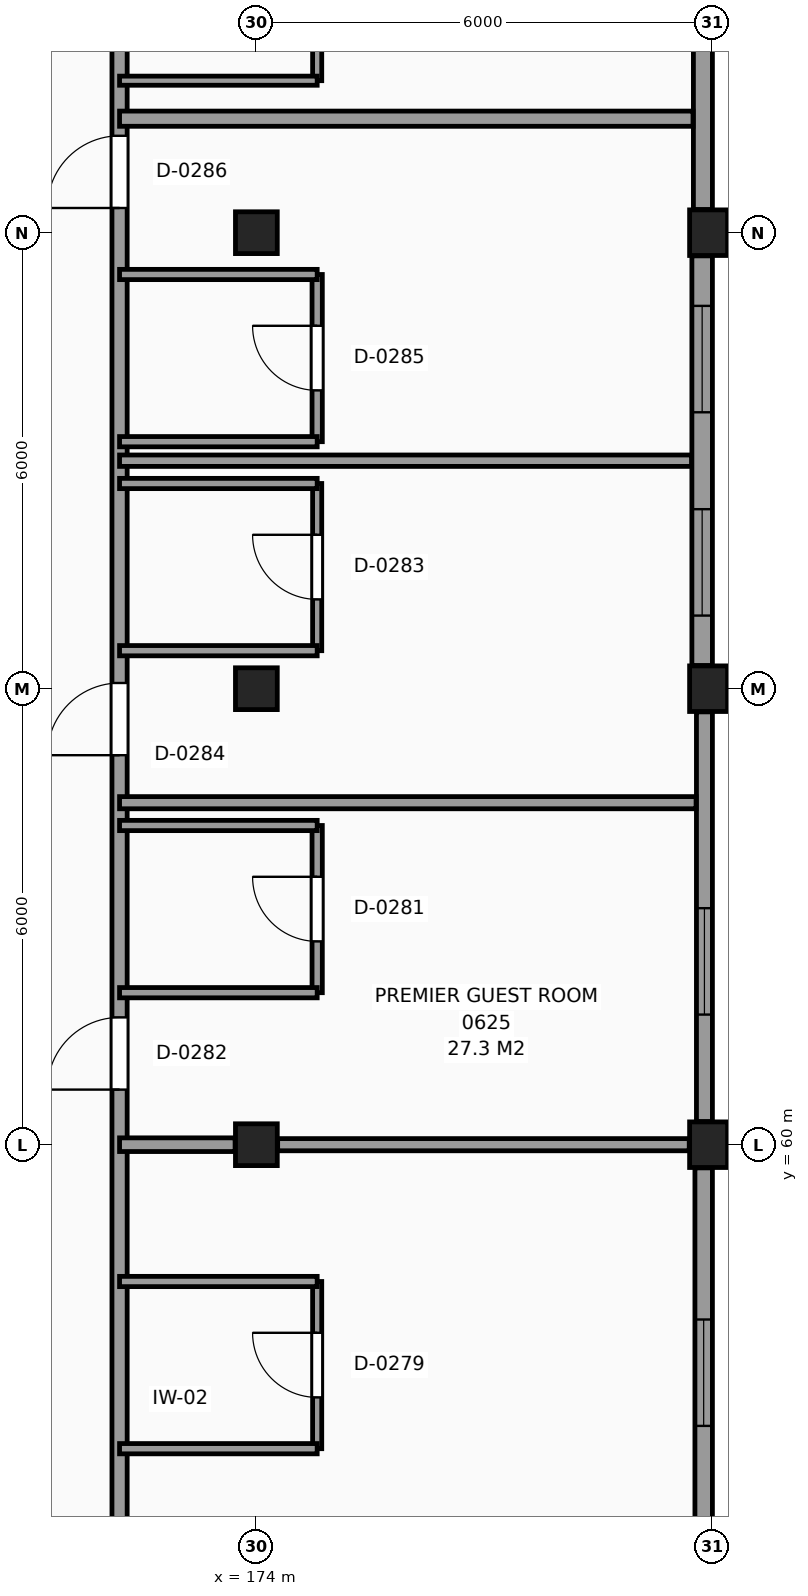
"""IFC4 building model, lengths in metres.
Left out: names, types, materials, properties, quantities, classifications, styles, units other than length and angle.
Written with IfcOpenShell. Run it as: python <this file> out.ifc"""

import sys

from ifc_helpers import new_model, si_unit, direction, frame, frame_2d, origin, origin_2d, place, context, subcontext, project, spatial, rectangle, extrude, element, fill, save


model = new_model("IFC4")
c1 = context("Model", 3, precision=1e-05, world=origin(), true_north=direction((0.0, 1.0)))
c2 = subcontext(c1, "Body", "Model", "MODEL_VIEW")
j1 = project(units=[si_unit("LENGTHUNIT", "METRE"), si_unit("PLANEANGLEUNIT", "RADIAN")], contexts=[c1])
p1 = place(None, origin())
s1 = spatial("IfcSite", under=j1, at=p1, CompositionType="ELEMENT")
p2 = place(p1, origin())
s2 = spatial("IfcBuilding", under=s1, at=p2, CompositionType="ELEMENT")
p3 = place(p2, frame((0.0, 0.0, 28.2)))
s3 = spatial("IfcBuildingStorey", under=s2, at=p3, CompositionType="ELEMENT", Elevation=28.2)
for number, where, z_axis, x_axis in (
    (1, (174.0, 60.0, 0.0), (0.0, 0.0, 1.0), (1.0, 0.0, 0.0)),
    (2, (174.0, 66.0, 0.0), (0.0, 0.0, 1.0), (1.0, 0.0, 0.0)),
    (3, (174.0, 72.0, 0.0), (0.0, 0.0, 1.0), (1.0, 0.0, 0.0)),
):
    element("IfcColumn", number, at=place(p3, frame(where, z_axis=z_axis, x_axis=x_axis)), inside=s3, PredefinedType="COLUMN", context=c2, shape_type="SweptSolid", body=[
        extrude(rectangle(XDim=0.55, YDim=0.55, at=origin_2d()), origin(), (0.0, 0.0, 1.0), 3.3),
    ])
for number, where, z_axis, x_axis in (
    (4, (180.0, 60.0, 0.0), (0.0, 0.0, 1.0), (1.0, 0.0, 0.0)),
    (5, (180.0, 66.0, 0.0), (0.0, 0.0, 1.0), (1.0, 0.0, 0.0)),
    (6, (180.0, 72.0, 0.0), (0.0, 0.0, 1.0), (1.0, 0.0, 0.0)),
):
    element("IfcColumn", number, at=place(p3, frame(where, z_axis=z_axis, x_axis=x_axis)), inside=s3, PredefinedType="COLUMN", context=c2, shape_type="SweptSolid", body=[
        extrude(rectangle(XDim=0.6, YDim=0.6, at=origin_2d()), origin(), (0.0, 0.0, 1.0), 3.3),
    ])
p4 = place(p3, frame((179.885, 54.305, 0.0), z_axis=(0.0, 0.0, 1.0), x_axis=(0.0, 1.0, 0.0)))
e7 = element("IfcWall", 7, at=p4, inside=s3, PredefinedType="SOLIDWALL", context=c2, shape_type="SweptSolid", body=[
    extrude(rectangle(XDim=5.39, YDim=0.23, at=frame_2d((2.695, 0.0))), origin(), (0.0, 0.0, 1.0), 2.43),
])
p5 = place(p4, frame((1.995, 0.0, 0.8)))
e8 = element("IfcOpeningElement", 8, at=p5, cuts=e7, PredefinedType="OPENING", context=c2, shape_type="SweptSolid", body=[
    extrude(rectangle(XDim=1.4, YDim=1.4, at=frame_2d((0.7, 0.7))), frame((0.0, 0.125, 0.0), z_axis=(0.0, -1.0, 0.0), x_axis=(1.0, 0.0, 0.0)), (0.0, 0.0, 1.0), 0.25),
])
p6 = place(p3, frame((179.895, 60.305, 0.0), z_axis=(0.0, 0.0, 1.0), x_axis=(0.0, 1.0, 0.0)))
e9 = element("IfcWall", 9, at=p6, inside=s3, PredefinedType="SOLIDWALL", context=c2, shape_type="SweptSolid", body=[
    extrude(rectangle(XDim=5.39, YDim=0.21, at=frame_2d((2.695, 0.0))), origin(), (0.0, 0.0, 1.0), 2.43),
])
p7 = place(p6, frame((1.407, 0.0, 0.8)))
e10 = element("IfcOpeningElement", 10, at=p7, cuts=e9, PredefinedType="OPENING", context=c2, shape_type="SweptSolid", body=[
    extrude(rectangle(XDim=1.4, YDim=1.4, at=frame_2d((0.7, 0.7))), frame((0.0, 0.115, 0.0), z_axis=(0.0, -1.0, 0.0), x_axis=(1.0, 0.0, 0.0)), (0.0, 0.0, 1.0), 0.23),
])
p8 = place(p3, frame((179.865, 66.305, 0.0), z_axis=(0.0, 0.0, 1.0), x_axis=(0.0, 1.0, 0.0)))
e11 = element("IfcWall", 11, at=p8, inside=s3, PredefinedType="SOLIDWALL", context=c2, shape_type="SweptSolid", body=[
    extrude(rectangle(XDim=5.39, YDim=0.27, at=frame_2d((2.695, 0.0))), origin(), (0.0, 0.0, 1.0), 2.43),
])
p9 = place(p8, frame((0.657, 0.0, 0.8)))
e12 = element("IfcOpeningElement", 12, at=p9, cuts=e11, PredefinedType="OPENING", context=c2, shape_type="SweptSolid", body=[
    extrude(rectangle(XDim=1.4, YDim=1.4, at=frame_2d((0.7, 0.7))), frame((0.0, 0.145, 0.0), z_axis=(0.0, -1.0, 0.0), x_axis=(1.0, 0.0, 0.0)), (0.0, 0.0, 1.0), 0.29),
])
p10 = place(p8, frame((3.332, 0.0, 0.8)))
e13 = element("IfcOpeningElement", 13, at=p10, cuts=e11, PredefinedType="OPENING", context=c2, shape_type="SweptSolid", body=[
    extrude(rectangle(XDim=1.4, YDim=1.4, at=frame_2d((0.7, 0.7))), frame((0.0, 0.145, 0.0), z_axis=(0.0, -1.0, 0.0), x_axis=(1.0, 0.0, 0.0)), (0.0, 0.0, 1.0), 0.29),
])
p11 = place(p3, frame((179.875, 72.305, 0.0), z_axis=(0.0, 0.0, 1.0), x_axis=(0.0, 1.0, 0.0)))
e14 = element("IfcWall", 14, at=p11, inside=s3, PredefinedType="SOLIDWALL", context=c2, shape_type="SweptSolid", body=[
    extrude(rectangle(XDim=5.39, YDim=0.25, at=frame_2d((2.695, 0.0))), origin(), (0.0, 0.0, 1.0), 2.43),
])
p12 = place(p11, frame((2.582, 0.0, 0.8)))
e15 = element("IfcOpeningElement", 15, at=p12, cuts=e14, PredefinedType="OPENING", context=c2, shape_type="SweptSolid", body=[
    extrude(rectangle(XDim=1.4, YDim=1.4, at=frame_2d((0.7, 0.7))), frame((0.0, 0.135, 0.0), z_axis=(0.0, -1.0, 0.0), x_axis=(1.0, 0.0, 0.0)), (0.0, 0.0, 1.0), 0.27),
])
p13 = place(p3, frame((172.2, 42.275, 0.0), z_axis=(0.0, 0.0, 1.0), x_axis=(0.0, 1.0, 0.0)))
e16 = element("IfcWall", 16, at=p13, inside=s3, PredefinedType="PARTITIONING", context=c2, shape_type="SweptSolid", body=[
    extrude(rectangle(XDim=65.545, YDim=0.2, at=frame_2d((32.772, 0.0))), origin(), (0.0, 0.0, 1.0), 3.08),
])
p14 = place(p13, frame((0.4, 0.0, 0.0)))
e17 = element("IfcOpeningElement", 17, at=p14, cuts=e16, PredefinedType="OPENING", context=c2, shape_type="SweptSolid", body=[
    extrude(rectangle(XDim=0.95, YDim=2.1, at=frame_2d((0.475, 1.05))), frame((0.0, 0.11, 0.0), z_axis=(0.0, -1.0, 0.0), x_axis=(1.0, 0.0, 0.0)), (0.0, 0.0, 1.0), 0.22),
])
p15 = place(p13, frame((4.85, 0.0, 0.0)))
e18 = element("IfcOpeningElement", 18, at=p15, cuts=e16, PredefinedType="OPENING", context=c2, shape_type="SweptSolid", body=[
    extrude(rectangle(XDim=0.95, YDim=2.1, at=frame_2d((0.475, 1.05))), frame((0.0, 0.11, 0.0), z_axis=(0.0, -1.0, 0.0), x_axis=(1.0, 0.0, 0.0)), (0.0, 0.0, 1.0), 0.22),
])
p16 = place(p13, frame((9.35, 0.0, 0.0)))
e19 = element("IfcOpeningElement", 19, at=p16, cuts=e16, PredefinedType="OPENING", context=c2, shape_type="SweptSolid", body=[
    extrude(rectangle(XDim=0.95, YDim=2.1, at=frame_2d((0.475, 1.05))), frame((0.0, 0.11, 0.0), z_axis=(0.0, -1.0, 0.0), x_axis=(1.0, 0.0, 0.0)), (0.0, 0.0, 1.0), 0.22),
])
p17 = place(p13, frame((18.45, 0.0, 0.0)))
e20 = element("IfcOpeningElement", 20, at=p17, cuts=e16, PredefinedType="OPENING", context=c2, shape_type="SweptSolid", body=[
    extrude(rectangle(XDim=0.95, YDim=2.1, at=frame_2d((0.475, 1.05))), frame((0.0, 0.11, 0.0), z_axis=(0.0, -1.0, 0.0), x_axis=(1.0, 0.0, 0.0)), (0.0, 0.0, 1.0), 0.22),
])
p18 = place(p13, frame((22.85, 0.0, 0.0)))
e21 = element("IfcOpeningElement", 21, at=p18, cuts=e16, PredefinedType="OPENING", context=c2, shape_type="SweptSolid", body=[
    extrude(rectangle(XDim=0.95, YDim=2.1, at=frame_2d((0.475, 1.05))), frame((0.0, 0.11, 0.0), z_axis=(0.0, -1.0, 0.0), x_axis=(1.0, 0.0, 0.0)), (0.0, 0.0, 1.0), 0.22),
])
p19 = place(p13, frame((30.05, 0.0, 0.0)))
e22 = element("IfcOpeningElement", 22, at=p19, cuts=e16, PredefinedType="OPENING", context=c2, shape_type="SweptSolid", body=[
    extrude(rectangle(XDim=0.95, YDim=2.1, at=frame_2d((0.475, 1.05))), frame((0.0, 0.11, 0.0), z_axis=(0.0, -1.0, 0.0), x_axis=(1.0, 0.0, 0.0)), (0.0, 0.0, 1.0), 0.22),
])
p20 = place(p13, frame((38.3, 0.0, 0.0)))
e23 = element("IfcOpeningElement", 23, at=p20, cuts=e16, PredefinedType="OPENING", context=c2, shape_type="SweptSolid", body=[
    extrude(rectangle(XDim=0.95, YDim=2.1, at=frame_2d((0.475, 1.05))), frame((0.0, 0.11, 0.0), z_axis=(0.0, -1.0, 0.0), x_axis=(1.0, 0.0, 0.0)), (0.0, 0.0, 1.0), 0.22),
])
p21 = place(p13, frame((40.85, 0.0, 0.0)))
e24 = element("IfcOpeningElement", 24, at=p21, cuts=e16, PredefinedType="OPENING", context=c2, shape_type="SweptSolid", body=[
    extrude(rectangle(XDim=0.95, YDim=2.1, at=frame_2d((0.475, 1.05))), frame((0.0, 0.11, 0.0), z_axis=(0.0, -1.0, 0.0), x_axis=(1.0, 0.0, 0.0)), (0.0, 0.0, 1.0), 0.22),
])
p22 = place(p13, frame((48.05, 0.0, 0.0)))
e25 = element("IfcOpeningElement", 25, at=p22, cuts=e16, PredefinedType="OPENING", context=c2, shape_type="SweptSolid", body=[
    extrude(rectangle(XDim=0.95, YDim=2.1, at=frame_2d((0.475, 1.05))), frame((0.0, 0.11, 0.0), z_axis=(0.0, -1.0, 0.0), x_axis=(1.0, 0.0, 0.0)), (0.0, 0.0, 1.0), 0.22),
])
p23 = place(p13, frame((52.25, 0.0, 0.0)))
e26 = element("IfcOpeningElement", 26, at=p23, cuts=e16, PredefinedType="OPENING", context=c2, shape_type="SweptSolid", body=[
    extrude(rectangle(XDim=0.95, YDim=2.1, at=frame_2d((0.475, 1.05))), frame((0.0, 0.11, 0.0), z_axis=(0.0, -1.0, 0.0), x_axis=(1.0, 0.0, 0.0)), (0.0, 0.0, 1.0), 0.22),
])
p24 = place(p13, frame((54.45, 0.0, 0.0)))
e27 = element("IfcOpeningElement", 27, at=p24, cuts=e16, PredefinedType="OPENING", context=c2, shape_type="SweptSolid", body=[
    extrude(rectangle(XDim=0.95, YDim=2.1, at=frame_2d((0.475, 1.05))), frame((0.0, 0.11, 0.0), z_axis=(0.0, -1.0, 0.0), x_axis=(1.0, 0.0, 0.0)), (0.0, 0.0, 1.0), 0.22),
])
p25 = place(p13, frame((60.45, 0.0, 0.0)))
e28 = element("IfcOpeningElement", 28, at=p25, cuts=e16, PredefinedType="OPENING", context=c2, shape_type="SweptSolid", body=[
    extrude(rectangle(XDim=0.95, YDim=2.1, at=frame_2d((0.475, 1.05))), frame((0.0, 0.11, 0.0), z_axis=(0.0, -1.0, 0.0), x_axis=(1.0, 0.0, 0.0)), (0.0, 0.0, 1.0), 0.22),
])
p26 = place(p3, frame((174.8, 56.0, 0.0), z_axis=(0.0, 0.0, 1.0), x_axis=(0.0, 1.0, 0.0)))
e29 = element("IfcWall", 29, at=p26, inside=s3, PredefinedType="PARTITIONING", context=c2, shape_type="SweptSolid", body=[
    extrude(rectangle(XDim=2.2, YDim=0.12, at=frame_2d((1.1, 0.0))), origin(), (0.0, 0.0, 1.0), 3.08),
])
p27 = place(p26, frame((0.675, 0.0, 0.0)))
e30 = element("IfcOpeningElement", 30, at=p27, cuts=e29, PredefinedType="OPENING", context=c2, shape_type="SweptSolid", body=[
    extrude(rectangle(XDim=0.85, YDim=2.1, at=frame_2d((0.425, 1.05))), frame((0.0, 0.07, 0.0), z_axis=(0.0, -1.0, 0.0), x_axis=(1.0, 0.0, 0.0)), (0.0, 0.0, 1.0), 0.14),
])
p28 = place(p3, frame((174.8, 62.0, 0.0), z_axis=(0.0, 0.0, 1.0), x_axis=(0.0, 1.0, 0.0)))
e31 = element("IfcWall", 31, at=p28, inside=s3, PredefinedType="PARTITIONING", context=c2, shape_type="SweptSolid", body=[
    extrude(rectangle(XDim=2.2, YDim=0.135, at=frame_2d((1.1, 0.0))), origin(), (0.0, 0.0, 1.0), 3.08),
])
p29 = place(p28, frame((0.675, 0.0, 0.0)))
e32 = element("IfcOpeningElement", 32, at=p29, cuts=e31, PredefinedType="OPENING", context=c2, shape_type="SweptSolid", body=[
    extrude(rectangle(XDim=0.85, YDim=2.1, at=frame_2d((0.425, 1.05))), frame((0.0, 0.078, 0.0), z_axis=(0.0, -1.0, 0.0), x_axis=(1.0, 0.0, 0.0)), (0.0, 0.0, 1.0), 0.155),
])
p30 = place(p3, frame((174.8, 66.5, 0.0), z_axis=(0.0, 0.0, 1.0), x_axis=(0.0, 1.0, 0.0)))
e33 = element("IfcWall", 33, at=p30, inside=s3, PredefinedType="PARTITIONING", context=c2, shape_type="SweptSolid", body=[
    extrude(rectangle(XDim=2.2, YDim=0.12, at=frame_2d((1.1, 0.0))), origin(), (0.0, 0.0, 1.0), 3.08),
])
p31 = place(p30, frame((0.675, 0.0, 0.0)))
e34 = element("IfcOpeningElement", 34, at=p31, cuts=e33, PredefinedType="OPENING", context=c2, shape_type="SweptSolid", body=[
    extrude(rectangle(XDim=0.85, YDim=2.1, at=frame_2d((0.425, 1.05))), frame((0.0, 0.07, 0.0), z_axis=(0.0, -1.0, 0.0), x_axis=(1.0, 0.0, 0.0)), (0.0, 0.0, 1.0), 0.14),
])
p32 = place(p3, frame((174.8, 69.25, 0.0), z_axis=(0.0, 0.0, 1.0), x_axis=(0.0, 1.0, 0.0)))
e35 = element("IfcWall", 35, at=p32, inside=s3, PredefinedType="PARTITIONING", context=c2, shape_type="SweptSolid", body=[
    extrude(rectangle(XDim=2.2, YDim=0.135, at=frame_2d((1.1, 0.0))), origin(), (0.0, 0.0, 1.0), 3.08),
])
p33 = place(p32, frame((0.675, 0.0, 0.0)))
e36 = element("IfcOpeningElement", 36, at=p33, cuts=e35, PredefinedType="OPENING", context=c2, shape_type="SweptSolid", body=[
    extrude(rectangle(XDim=0.85, YDim=2.1, at=frame_2d((0.425, 1.05))), frame((0.0, 0.078, 0.0), z_axis=(0.0, -1.0, 0.0), x_axis=(1.0, 0.0, 0.0)), (0.0, 0.0, 1.0), 0.155),
])
p34 = place(p3, frame((174.8, 74.0, 0.0), z_axis=(0.0, 0.0, 1.0), x_axis=(0.0, 1.0, 0.0)))
e37 = element("IfcWall", 37, at=p34, inside=s3, PredefinedType="PARTITIONING", context=c2, shape_type="SweptSolid", body=[
    extrude(rectangle(XDim=2.2, YDim=0.12, at=frame_2d((1.1, 0.0))), origin(), (0.0, 0.0, 1.0), 3.08),
])
p35 = place(p34, frame((0.675, 0.0, 0.0)))
e38 = element("IfcOpeningElement", 38, at=p35, cuts=e37, PredefinedType="OPENING", context=c2, shape_type="SweptSolid", body=[
    extrude(rectangle(XDim=0.85, YDim=2.1, at=frame_2d((0.425, 1.05))), frame((0.0, 0.07, 0.0), z_axis=(0.0, -1.0, 0.0), x_axis=(1.0, 0.0, 0.0)), (0.0, 0.0, 1.0), 0.14),
])
for number, where, z_axis, x_axis in (
    (39, (172.2, 56.0, 0.0), (0.0, 0.0, 1.0), (1.0, 0.0, 0.0)),
    (40, (172.2, 58.2, 0.0), (0.0, 0.0, 1.0), (1.0, 0.0, 0.0)),
):
    element("IfcWall", number, at=place(p3, frame(where, z_axis=z_axis, x_axis=x_axis)), inside=s3, PredefinedType="PARTITIONING", context=c2, shape_type="SweptSolid", body=[
        extrude(rectangle(XDim=2.6, YDim=0.135, at=frame_2d((1.3, 0.0))), origin(), (0.0, 0.0, 1.0), 3.08),
    ])
p36 = place(p3, frame((172.2, 60.0, 0.0), z_axis=(0.0, 0.0, 1.0), x_axis=(1.0, 0.0, 0.0)))
e41 = element("IfcWall", 41, at=p36, inside=s3, PredefinedType="PARTITIONING", context=c2, shape_type="SweptSolid", body=[
    extrude(rectangle(XDim=1.52, YDim=0.18, at=frame_2d((0.76, 0.0))), origin(), (0.0, 0.0, 1.0), 2.28),
])
p37 = place(p3, frame((174.28, 60.0, 0.0), z_axis=(0.0, 0.0, 1.0), x_axis=(1.0, 0.0, 0.0)))
e42 = element("IfcWall", 42, at=p37, inside=s3, PredefinedType="PARTITIONING", context=c2, shape_type="SweptSolid", body=[
    extrude(rectangle(XDim=5.415, YDim=0.16, at=frame_2d((2.708, 0.0))), origin(), (0.0, 0.0, 1.0), 2.28),
])
for number, where, z_axis, x_axis in (
    (43, (172.2, 62.0, 0.0), (0.0, 0.0, 1.0), (1.0, 0.0, 0.0)),
    (44, (172.2, 64.2, 0.0), (0.0, 0.0, 1.0), (1.0, 0.0, 0.0)),
):
    element("IfcWall", number, at=place(p3, frame(where, z_axis=z_axis, x_axis=x_axis)), inside=s3, PredefinedType="PARTITIONING", context=c2, shape_type="SweptSolid", body=[
        extrude(rectangle(XDim=2.6, YDim=0.135, at=frame_2d((1.3, 0.0))), origin(), (0.0, 0.0, 1.0), 3.08),
    ])
p38 = place(p3, frame((172.2, 64.5, 0.0), z_axis=(0.0, 0.0, 1.0), x_axis=(1.0, 0.0, 0.0)))
e45 = element("IfcWall", 45, at=p38, inside=s3, PredefinedType="PARTITIONING", context=c2, shape_type="SweptSolid", body=[
    extrude(rectangle(XDim=7.585, YDim=0.16, at=frame_2d((3.792, 0.0))), origin(), (0.0, 0.0, 1.0), 3.08),
])
for number, where, z_axis, x_axis in (
    (46, (172.2, 66.5, 0.0), (0.0, 0.0, 1.0), (1.0, 0.0, 0.0)),
    (47, (172.2, 68.7, 0.0), (0.0, 0.0, 1.0), (1.0, 0.0, 0.0)),
):
    element("IfcWall", number, at=place(p3, frame(where, z_axis=z_axis, x_axis=x_axis)), inside=s3, PredefinedType="PARTITIONING", context=c2, shape_type="SweptSolid", body=[
        extrude(rectangle(XDim=2.6, YDim=0.135, at=frame_2d((1.3, 0.0))), origin(), (0.0, 0.0, 1.0), 3.08),
    ])
p39 = place(p3, frame((172.2, 69.0, 0.0), z_axis=(0.0, 0.0, 1.0), x_axis=(1.0, 0.0, 0.0)))
e48 = element("IfcWall", 48, at=p39, inside=s3, PredefinedType="PARTITIONING", context=c2, shape_type="SweptSolid", body=[
    extrude(rectangle(XDim=7.525, YDim=0.15, at=frame_2d((3.763, 0.0))), origin(), (0.0, 0.0, 1.0), 3.08),
])
for number, where, z_axis, x_axis in (
    (49, (172.2, 69.25, 0.0), (0.0, 0.0, 1.0), (1.0, 0.0, 0.0)),
    (50, (172.2, 71.45, 0.0), (0.0, 0.0, 1.0), (1.0, 0.0, 0.0)),
):
    element("IfcWall", number, at=place(p3, frame(where, z_axis=z_axis, x_axis=x_axis)), inside=s3, PredefinedType="PARTITIONING", context=c2, shape_type="SweptSolid", body=[
        extrude(rectangle(XDim=2.6, YDim=0.135, at=frame_2d((1.3, 0.0))), origin(), (0.0, 0.0, 1.0), 3.08),
    ])
p40 = place(p3, frame((172.2, 73.5, 0.0), z_axis=(0.0, 0.0, 1.0), x_axis=(1.0, 0.0, 0.0)))
e51 = element("IfcWall", 51, at=p40, inside=s3, PredefinedType="PARTITIONING", context=c2, shape_type="SweptSolid", body=[
    extrude(rectangle(XDim=7.545, YDim=0.2, at=frame_2d((3.772, 0.0))), origin(), (0.0, 0.0, 1.0), 3.08),
])
p41 = place(p3, frame((172.2, 74.0, 0.0), z_axis=(0.0, 0.0, 1.0), x_axis=(1.0, 0.0, 0.0)))
e52 = element("IfcWall", 52, at=p41, inside=s3, PredefinedType="PARTITIONING", context=c2, shape_type="SweptSolid", body=[
    extrude(rectangle(XDim=2.6, YDim=0.12, at=frame_2d((1.3, 0.0))), origin(), (0.0, 0.0, 1.0), 3.08),
])
p42 = place(p5, origin())
e53 = element("IfcWindow", 53, at=p42, inside=s3, PartitioningType="SINGLE_PANEL", PredefinedType="WINDOW", context=c2, shape_type="SweptSolid", body=[
    extrude(rectangle(XDim=1.4, YDim=1.4, at=frame_2d((0.7, 0.7))), frame((0.0, 0.03, 0.0), z_axis=(0.0, -1.0, 0.0), x_axis=(1.0, 0.0, 0.0)), (0.0, 0.0, 1.0), 0.06),
])
fill(e8, e53)
p43 = place(p7, origin())
e54 = element("IfcWindow", 54, at=p43, inside=s3, PartitioningType="SINGLE_PANEL", PredefinedType="WINDOW", context=c2, shape_type="SweptSolid", body=[
    extrude(rectangle(XDim=1.4, YDim=1.4, at=frame_2d((0.7, 0.7))), frame((0.0, 0.03, 0.0), z_axis=(0.0, -1.0, 0.0), x_axis=(1.0, 0.0, 0.0)), (0.0, 0.0, 1.0), 0.06),
])
fill(e10, e54)
p44 = place(p9, origin())
e55 = element("IfcWindow", 55, at=p44, inside=s3, PartitioningType="SINGLE_PANEL", PredefinedType="WINDOW", context=c2, shape_type="SweptSolid", body=[
    extrude(rectangle(XDim=1.4, YDim=1.4, at=frame_2d((0.7, 0.7))), frame((0.0, 0.03, 0.0), z_axis=(0.0, -1.0, 0.0), x_axis=(1.0, 0.0, 0.0)), (0.0, 0.0, 1.0), 0.06),
])
fill(e12, e55)
p45 = place(p10, origin())
e56 = element("IfcWindow", 56, at=p45, inside=s3, PartitioningType="SINGLE_PANEL", PredefinedType="WINDOW", context=c2, shape_type="SweptSolid", body=[
    extrude(rectangle(XDim=1.4, YDim=1.4, at=frame_2d((0.7, 0.7))), frame((0.0, 0.03, 0.0), z_axis=(0.0, -1.0, 0.0), x_axis=(1.0, 0.0, 0.0)), (0.0, 0.0, 1.0), 0.06),
])
fill(e13, e56)
p46 = place(p27, origin())
e57 = element("IfcDoor", 57, at=p46, inside=s3, OperationType="SINGLE_SWING_RIGHT", PredefinedType="DOOR", context=c2, shape_type="SweptSolid", body=[
    extrude(rectangle(XDim=0.85, YDim=2.1, at=frame_2d((0.425, 1.05))), frame((0.0, 0.025, 0.0), z_axis=(0.0, -1.0, 0.0), x_axis=(1.0, 0.0, 0.0)), (0.0, 0.0, 1.0), 0.05),
])
fill(e30, e57)
p47 = place(p29, origin())
e58 = element("IfcDoor", 58, at=p47, inside=s3, OperationType="SINGLE_SWING_RIGHT", PredefinedType="DOOR", context=c2, shape_type="SweptSolid", body=[
    extrude(rectangle(XDim=0.85, YDim=2.1, at=frame_2d((0.425, 1.05))), frame((0.0, 0.025, 0.0), z_axis=(0.0, -1.0, 0.0), x_axis=(1.0, 0.0, 0.0)), (0.0, 0.0, 1.0), 0.05),
])
fill(e32, e58)
p48 = place(p17, origin())
e59 = element("IfcDoor", 59, at=p48, inside=s3, OperationType="SINGLE_SWING_LEFT", PredefinedType="DOOR", context=c2, shape_type="SweptSolid", body=[
    extrude(rectangle(XDim=0.95, YDim=2.1, at=frame_2d((0.475, 1.05))), frame((0.0, 0.025, 0.0), z_axis=(0.0, -1.0, 0.0), x_axis=(1.0, 0.0, 0.0)), (0.0, 0.0, 1.0), 0.05),
])
fill(e20, e59)
p49 = place(p31, origin())
e60 = element("IfcDoor", 60, at=p49, inside=s3, OperationType="SINGLE_SWING_RIGHT", PredefinedType="DOOR", context=c2, shape_type="SweptSolid", body=[
    extrude(rectangle(XDim=0.85, YDim=2.1, at=frame_2d((0.425, 1.05))), frame((0.0, 0.025, 0.0), z_axis=(0.0, -1.0, 0.0), x_axis=(1.0, 0.0, 0.0)), (0.0, 0.0, 1.0), 0.05),
])
fill(e34, e60)
p50 = place(p18, origin())
e61 = element("IfcDoor", 61, at=p50, inside=s3, OperationType="SINGLE_SWING_LEFT", PredefinedType="DOOR", context=c2, shape_type="SweptSolid", body=[
    extrude(rectangle(XDim=0.95, YDim=2.1, at=frame_2d((0.475, 1.05))), frame((0.0, 0.025, 0.0), z_axis=(0.0, -1.0, 0.0), x_axis=(1.0, 0.0, 0.0)), (0.0, 0.0, 1.0), 0.05),
])
fill(e21, e61)
p51 = place(p33, origin())
e62 = element("IfcDoor", 62, at=p51, inside=s3, OperationType="SINGLE_SWING_RIGHT", PredefinedType="DOOR", context=c2, shape_type="SweptSolid", body=[
    extrude(rectangle(XDim=0.85, YDim=2.1, at=frame_2d((0.425, 1.05))), frame((0.0, 0.025, 0.0), z_axis=(0.0, -1.0, 0.0), x_axis=(1.0, 0.0, 0.0)), (0.0, 0.0, 1.0), 0.05),
])
fill(e36, e62)
p52 = place(p19, origin())
e63 = element("IfcDoor", 63, at=p52, inside=s3, OperationType="SINGLE_SWING_LEFT", PredefinedType="DOOR", context=c2, shape_type="SweptSolid", body=[
    extrude(rectangle(XDim=0.95, YDim=2.1, at=frame_2d((0.475, 1.05))), frame((0.0, 0.025, 0.0), z_axis=(0.0, -1.0, 0.0), x_axis=(1.0, 0.0, 0.0)), (0.0, 0.0, 1.0), 0.05),
])
fill(e22, e63)
save(model, sys.argv[1])
